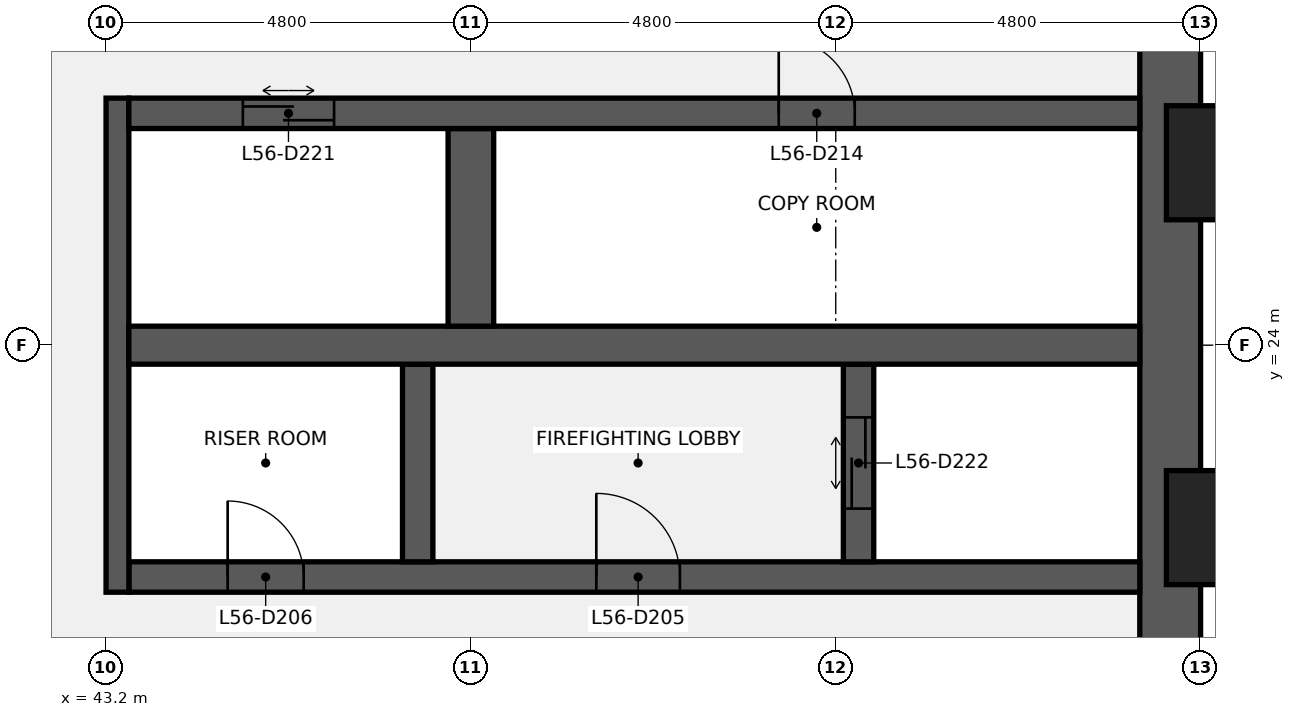
"""IFC4 building model, lengths in metres.
Left out: names, types, materials, properties, quantities, classifications, styles, units other than length and angle.
Written with IfcOpenShell. Run it as: python <this file> out.ifc"""

import sys

from ifc_helpers import new_model, si_unit, direction, frame, frame_2d, origin, origin_2d, place, context, subcontext, project, spatial, rectangle, extrude, element, fill, save


model = new_model("IFC4")
c1 = context("Model", 3, precision=1e-05, world=origin(), true_north=direction((0.0, 1.0)))
c2 = subcontext(c1, "Body", "Model", "MODEL_VIEW")
j1 = project(units=[si_unit("LENGTHUNIT", "METRE"), si_unit("PLANEANGLEUNIT", "RADIAN")], contexts=[c1])
p1 = place(None, origin())
s1 = spatial("IfcSite", under=j1, at=p1, CompositionType="ELEMENT")
p2 = place(p1, origin())
s2 = spatial("IfcBuilding", under=s1, at=p2, CompositionType="ELEMENT")
p3 = place(p2, frame((0.0, 0.0, 253.2)))
s3 = spatial("IfcBuildingStorey", under=s2, at=p3, CompositionType="ELEMENT", Elevation=253.2)
p4 = place(p3, frame((57.2, 38.4, 0.0), z_axis=(0.0, 0.0, 1.0), x_axis=(0.0, -1.0, 0.0)))
e1 = element("IfcWall", 1, at=p4, inside=s3, PredefinedType="SHEAR", context=c2, shape_type="SweptSolid", body=[
    extrude(rectangle(XDim=28.8, YDim=0.8, at=frame_2d((14.4, 0.0))), origin(), (0.0, 0.0, 1.0), 3.84),
])
p5 = place(p4, frame((18.45, 0.0, 0.9)))
e2 = element("IfcOpeningElement", 2, at=p5, cuts=e1, PredefinedType="OPENING", context=c2, shape_type="SweptSolid", body=[
    extrude(rectangle(XDim=1.5, YDim=1.5, at=frame_2d((0.75, 0.75))), frame((0.0, 0.41, 0.0), z_axis=(0.0, -1.0, 0.0), x_axis=(1.0, 0.0, 0.0)), (0.0, 0.0, 1.0), 0.82),
])
p6 = place(p4, frame((8.85, 0.0, 0.9)))
e3 = element("IfcOpeningElement", 3, at=p6, cuts=e1, PredefinedType="OPENING", context=c2, shape_type="SweptSolid", body=[
    extrude(rectangle(XDim=1.5, YDim=1.5, at=frame_2d((0.75, 0.75))), frame((0.0, 0.41, 0.0), z_axis=(0.0, -1.0, 0.0), x_axis=(1.0, 0.0, 0.0)), (0.0, 0.0, 1.0), 0.82),
])
p7 = place(p3, frame((43.5, 20.95, 0.0), z_axis=(0.0, 0.0, 1.0), x_axis=(1.0, 0.0, 0.0)))
e4 = element("IfcWall", 4, at=p7, inside=s3, PredefinedType="SHEAR", context=c2, shape_type="SweptSolid", body=[
    extrude(rectangle(XDim=13.3, YDim=0.4, at=frame_2d((6.65, 0.0))), origin(), (0.0, 0.0, 1.0), 3.84),
])
p8 = place(p7, frame((6.15, 0.0, 0.0)))
e5 = element("IfcOpeningElement", 5, at=p8, cuts=e4, PredefinedType="OPENING", context=c2, shape_type="SweptSolid", body=[
    extrude(rectangle(XDim=1.1, YDim=2.1, at=frame_2d((0.55, 1.05))), frame((0.0, 0.21, 0.0), z_axis=(0.0, -1.0, 0.0), x_axis=(1.0, 0.0, 0.0)), (0.0, 0.0, 1.0), 0.42),
])
p9 = place(p7, frame((1.3, 0.0, 0.0)))
e6 = element("IfcOpeningElement", 6, at=p9, cuts=e4, PredefinedType="OPENING", context=c2, shape_type="SweptSolid", body=[
    extrude(rectangle(XDim=1.0, YDim=2.1, at=frame_2d((0.5, 1.05))), frame((0.0, 0.21, 0.0), z_axis=(0.0, -1.0, 0.0), x_axis=(1.0, 0.0, 0.0)), (0.0, 0.0, 1.0), 0.42),
])
p10 = place(p3, frame((43.35, 20.75, 0.0), z_axis=(0.0, 0.0, 1.0), x_axis=(0.0, 1.0, 0.0)))
e7 = element("IfcWall", 7, at=p10, inside=s3, PredefinedType="SHEAR", context=c2, shape_type="SweptSolid", body=[
    extrude(rectangle(XDim=6.5, YDim=0.3, at=frame_2d((3.25, 0.0))), origin(), (0.0, 0.0, 1.0), 3.84),
])
p11 = place(p3, frame((53.1, 21.15, 0.0), z_axis=(0.0, 0.0, 1.0), x_axis=(0.0, 1.0, 0.0)))
e8 = element("IfcWall", 8, at=p11, inside=s3, PredefinedType="SHEAR", context=c2, shape_type="SweptSolid", body=[
    extrude(rectangle(XDim=2.6, YDim=0.4, at=frame_2d((1.3, 0.0))), origin(), (0.0, 0.0, 1.0), 3.84),
])
p12 = place(p11, frame((0.7, 0.0, 0.0)))
e9 = element("IfcOpeningElement", 9, at=p12, cuts=e8, PredefinedType="OPENING", context=c2, shape_type="SweptSolid", body=[
    extrude(rectangle(XDim=1.2, YDim=2.1, at=frame_2d((0.6, 1.05))), frame((0.0, 0.21, 0.0), z_axis=(0.0, -1.0, 0.0), x_axis=(1.0, 0.0, 0.0)), (0.0, 0.0, 1.0), 0.42),
])
p13 = place(p3, frame((47.3, 21.15, 0.0), z_axis=(0.0, 0.0, 1.0), x_axis=(0.0, 1.0, 0.0)))
e10 = element("IfcWall", 10, at=p13, inside=s3, PredefinedType="SHEAR", context=c2, shape_type="SweptSolid", body=[
    extrude(rectangle(XDim=2.6, YDim=0.4, at=frame_2d((1.3, 0.0))), origin(), (0.0, 0.0, 1.0), 3.84),
])
p14 = place(p3, frame((43.5, 24.0, 0.0), z_axis=(0.0, 0.0, 1.0), x_axis=(1.0, 0.0, 0.0)))
e11 = element("IfcWall", 11, at=p14, inside=s3, PredefinedType="SHEAR", context=c2, shape_type="SweptSolid", body=[
    extrude(rectangle(XDim=13.3, YDim=0.5, at=frame_2d((6.65, 0.0))), origin(), (0.0, 0.0, 1.0), 3.84),
])
p15 = place(p3, frame((48.0, 24.25, 0.0), z_axis=(0.0, 0.0, 1.0), x_axis=(0.0, 1.0, 0.0)))
e12 = element("IfcWall", 12, at=p15, inside=s3, PredefinedType="SHEAR", context=c2, shape_type="SweptSolid", body=[
    extrude(rectangle(XDim=2.6, YDim=0.6, at=frame_2d((1.3, 0.0))), origin(), (0.0, 0.0, 1.0), 3.84),
])
p16 = place(p3, frame((43.5, 27.05, 0.0), z_axis=(0.0, 0.0, 1.0), x_axis=(1.0, 0.0, 0.0)))
e13 = element("IfcWall", 13, at=p16, inside=s3, PredefinedType="SHEAR", context=c2, shape_type="SweptSolid", body=[
    extrude(rectangle(XDim=13.3, YDim=0.4, at=frame_2d((6.65, 0.0))), origin(), (0.0, 0.0, 1.0), 3.84),
])
p17 = place(p16, frame((8.55, 0.0, 0.0)))
e14 = element("IfcOpeningElement", 14, at=p17, cuts=e13, PredefinedType="OPENING", context=c2, shape_type="SweptSolid", body=[
    extrude(rectangle(XDim=1.0, YDim=2.1, at=frame_2d((0.5, 1.05))), frame((0.0, 0.21, 0.0), z_axis=(0.0, -1.0, 0.0), x_axis=(1.0, 0.0, 0.0)), (0.0, 0.0, 1.0), 0.42),
])
p18 = place(p16, frame((1.5, 0.0, 0.0)))
e15 = element("IfcOpeningElement", 15, at=p18, cuts=e13, PredefinedType="OPENING", context=c2, shape_type="SweptSolid", body=[
    extrude(rectangle(XDim=1.2, YDim=2.1, at=frame_2d((0.6, 1.05))), frame((0.0, 0.21, 0.0), z_axis=(0.0, -1.0, 0.0), x_axis=(1.0, 0.0, 0.0)), (0.0, 0.0, 1.0), 0.42),
])
for number, where, z_axis, x_axis in (
    (16, (58.35, 21.6, 0.0), (0.0, 0.0, 1.0), (0.0, 1.0, 0.0)),
    (17, (58.35, 26.4, 0.0), (0.0, 0.0, 1.0), (0.0, 1.0, 0.0)),
):
    element("IfcColumn", number, at=place(p3, frame(where, z_axis=z_axis, x_axis=x_axis)), inside=s3, PredefinedType="PILASTER", context=c2, shape_type="SweptSolid", body=[
        extrude(rectangle(XDim=2.4, YDim=1.5, at=origin_2d()), origin(), (0.0, 0.0, 1.0), 4.0),
    ])
p19 = place(p8, origin())
e18 = element("IfcDoor", 18, at=p19, inside=s3, OperationType="SINGLE_SWING_LEFT", PredefinedType="DOOR", context=c2, shape_type="SweptSolid", body=[
    extrude(rectangle(XDim=1.1, YDim=2.1, at=frame_2d((0.55, 1.05))), frame((0.0, 0.025, 0.0), z_axis=(0.0, -1.0, 0.0), x_axis=(1.0, 0.0, 0.0)), (0.0, 0.0, 1.0), 0.05),
])
fill(e5, e18)
p20 = place(p9, origin())
e19 = element("IfcDoor", 19, at=p20, inside=s3, OperationType="SINGLE_SWING_LEFT", PredefinedType="DOOR", context=c2, shape_type="SweptSolid", body=[
    extrude(rectangle(XDim=1.0, YDim=2.1, at=frame_2d((0.5, 1.05))), frame((0.0, 0.025, 0.0), z_axis=(0.0, -1.0, 0.0), x_axis=(1.0, 0.0, 0.0)), (0.0, 0.0, 1.0), 0.05),
])
fill(e6, e19)
p21 = place(p17, origin())
e20 = element("IfcDoor", 20, at=p21, inside=s3, OperationType="SINGLE_SWING_LEFT", PredefinedType="DOOR", context=c2, shape_type="SweptSolid", body=[
    extrude(rectangle(XDim=1.0, YDim=2.1, at=frame_2d((0.5, 1.05))), frame((0.0, 0.025, 0.0), z_axis=(0.0, -1.0, 0.0), x_axis=(1.0, 0.0, 0.0)), (0.0, 0.0, 1.0), 0.05),
])
fill(e14, e20)
p22 = place(p18, origin())
e21 = element("IfcDoor", 21, at=p22, inside=s3, OperationType="DOUBLE_DOOR_SLIDING", PredefinedType="DOOR", context=c2, shape_type="SweptSolid", body=[
    extrude(rectangle(XDim=1.2, YDim=2.1, at=frame_2d((0.6, 1.05))), frame((0.0, 0.025, 0.0), z_axis=(0.0, -1.0, 0.0), x_axis=(1.0, 0.0, 0.0)), (0.0, 0.0, 1.0), 0.05),
])
fill(e15, e21)
p23 = place(p12, origin())
e22 = element("IfcDoor", 22, at=p23, inside=s3, OperationType="DOUBLE_DOOR_SLIDING", PredefinedType="DOOR", context=c2, shape_type="SweptSolid", body=[
    extrude(rectangle(XDim=1.2, YDim=2.1, at=frame_2d((0.6, 1.05))), frame((0.0, 0.025, 0.0), z_axis=(0.0, -1.0, 0.0), x_axis=(1.0, 0.0, 0.0)), (0.0, 0.0, 1.0), 0.05),
])
fill(e9, e22)
save(model, sys.argv[1])
